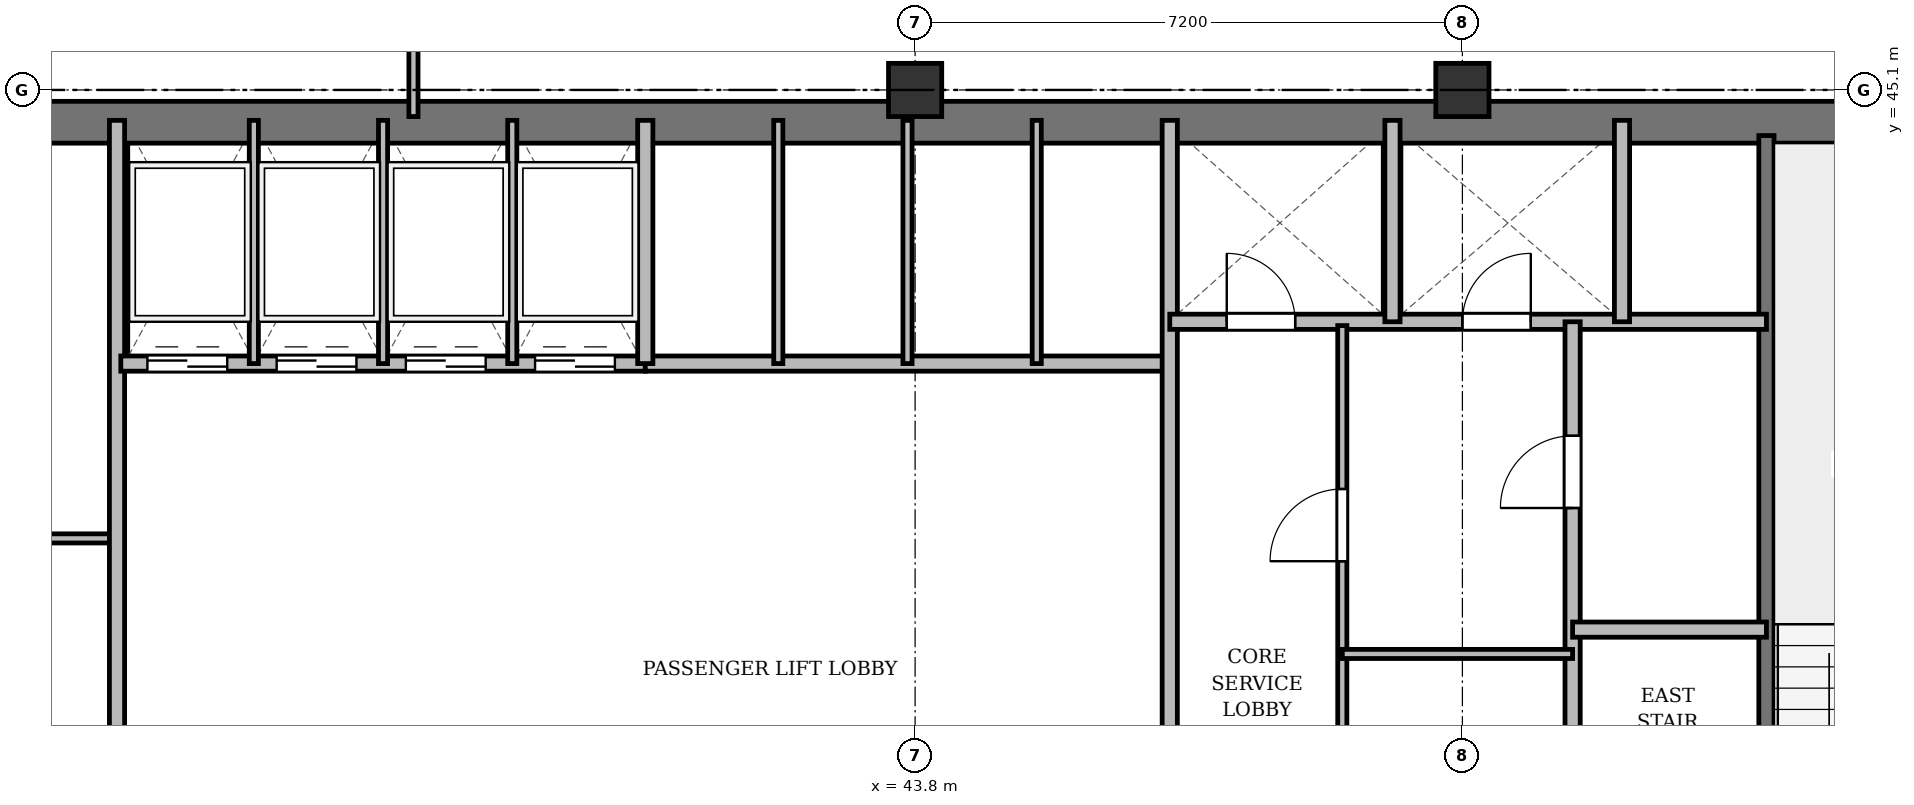
"""IFC4 building model, lengths in metres.
Left out: names, types, materials, properties, quantities, classifications, styles, units other than length and angle.
Written with IfcOpenShell. Run it as: python <this file> out.ifc"""

import sys

from ifc_helpers import new_model, si_unit, direction, frame, frame_2d, origin, origin_2d, place, context, subcontext, project, spatial, rectangle, extrude, source, transform, mapped, element, fill, save


model = new_model("IFC4")
c1 = context("Model", 3, precision=1e-05, world=origin(), true_north=direction((0.0, 1.0)))
c2 = subcontext(c1, "Body", "Model", "MODEL_VIEW")
j1 = project(units=[si_unit("LENGTHUNIT", "METRE"), si_unit("PLANEANGLEUNIT", "RADIAN")], contexts=[c1])
p1 = place(None, origin())
s1 = spatial("IfcSite", under=j1, at=p1, CompositionType="ELEMENT")
p2 = place(p1, origin())
s2 = spatial("IfcBuilding", under=s1, at=p2, CompositionType="ELEMENT")
p3 = place(p2, frame((0.0, 0.0, 201.3)))
s3 = spatial("IfcBuildingStorey", under=s2, at=p3, CompositionType="ELEMENT", Elevation=201.3)
m1 = source(origin(), c2, "Body", "SweptSolid", [
    extrude(rectangle(XDim=0.7, YDim=0.7, at=origin_2d()), origin(), (0.0, 0.0, 1.0), 3.6),
])
for number, where, z_axis, x_axis in (
    (1, (43.8, 45.1, 0.0), (0.0, 0.0, 1.0), (1.0, 0.0, 0.0)),
    (2, (51.0, 45.1, 0.0), (0.0, 0.0, 1.0), (1.0, 0.0, 0.0)),
):
    element("IfcColumn", number, at=place(p3, frame(where, z_axis=z_axis, x_axis=x_axis)), inside=s3, PredefinedType="COLUMN", context=c2, shape_type="MappedRepresentation", body=[
        mapped(m1, transform((0.0, 0.0, 0.0), x_axis=(1.0, 0.0, 0.0), y_axis=(0.0, 1.0, 0.0), z_axis=(0.0, 0.0, 1.0), scale=1.0)),
    ])
p4 = place(p3, frame((15.65, 44.675, 0.0), z_axis=(0.0, 0.0, 1.0), x_axis=(1.0, 0.0, 0.0)))
e3 = element("IfcWall", 3, at=p4, inside=s3, PredefinedType="SHEAR", context=c2, shape_type="SweptSolid", body=[
    extrude(rectangle(XDim=43.1, YDim=0.55, at=frame_2d((21.55, 0.0))), origin(), (0.0, 0.0, 1.0), 3.22),
])
p5 = place(p3, frame((55.0, 33.4, 0.0), z_axis=(0.0, 0.0, 1.0), x_axis=(0.0, 1.0, 0.0)))
e4 = element("IfcWall", 4, at=p5, inside=s3, PredefinedType="SHEAR", context=c2, shape_type="SweptSolid", body=[
    extrude(rectangle(XDim=11.1, YDim=0.2, at=frame_2d((5.55, 0.0))), origin(), (0.0, 0.0, 1.0), 3.22),
])
p6 = place(p5, frame((0.85, 0.0, 0.0)))
e5 = element("IfcOpeningElement", 5, at=p6, cuts=e4, PredefinedType="OPENING", context=c2, shape_type="SweptSolid", body=[
    extrude(rectangle(XDim=1.1, YDim=2.15, at=frame_2d((0.55, 1.075))), frame((0.0, 0.11, 0.0), z_axis=(0.0, -1.0, 0.0), x_axis=(1.0, 0.0, 0.0)), (0.0, 0.0, 1.0), 0.22),
])
p7 = place(p3, frame((26.3, 39.2, 0.0), z_axis=(0.0, 0.0, 1.0), x_axis=(1.0, 0.0, 0.0)))
e6 = element("IfcWall", 6, at=p7, inside=s3, PredefinedType="PARTITIONING", context=c2, shape_type="SweptSolid", body=[
    extrude(rectangle(XDim=7.0, YDim=0.12, at=frame_2d((3.5, 0.0))), origin(), (0.0, 0.0, 1.0), 2.72),
])
p8 = place(p7, frame((2.6, 0.0, 0.0)))
e7 = element("IfcOpeningElement", 7, at=p8, cuts=e6, PredefinedType="OPENING", context=c2, shape_type="SweptSolid", body=[
    extrude(rectangle(XDim=0.95, YDim=2.15, at=frame_2d((0.475, 1.075))), frame((0.0, 0.07, 0.0), z_axis=(0.0, -1.0, 0.0), x_axis=(1.0, 0.0, 0.0)), (0.0, 0.0, 1.0), 0.14),
])
p9 = place(p3, frame((33.3, 33.4, 0.0), z_axis=(0.0, 0.0, 1.0), x_axis=(0.0, 1.0, 0.0)))
e8 = element("IfcWall", 8, at=p9, inside=s3, PredefinedType="SOLIDWALL", context=c2, shape_type="SweptSolid", body=[
    extrude(rectangle(XDim=11.3, YDim=0.2, at=frame_2d((5.65, 0.0))), origin(), (0.0, 0.0, 1.0), 2.77),
])
p10 = place(p3, frame((33.35, 41.5, 0.0), z_axis=(0.0, 0.0, 1.0), x_axis=(1.0, 0.0, 0.0)))
e9 = element("IfcWall", 9, at=p10, inside=s3, PredefinedType="SOLIDWALL", context=c2, shape_type="SweptSolid", body=[
    extrude(rectangle(XDim=6.9, YDim=0.2, at=frame_2d((3.45, 0.0))), origin(), (0.0, 0.0, 1.0), 3.22),
])
p11 = place(p10, frame((0.35, 0.0, 0.0)))
e10 = element("IfcOpeningElement", 10, at=p11, cuts=e9, PredefinedType="OPENING", context=c2, shape_type="SweptSolid", body=[
    extrude(rectangle(XDim=1.05, YDim=2.15, at=frame_2d((0.525, 1.075))), frame((0.0, 0.11, 0.0), z_axis=(0.0, -1.0, 0.0), x_axis=(1.0, 0.0, 0.0)), (0.0, 0.0, 1.0), 0.22),
])
p12 = place(p10, frame((2.05, 0.0, 0.0)))
e11 = element("IfcOpeningElement", 11, at=p12, cuts=e9, PredefinedType="OPENING", context=c2, shape_type="SweptSolid", body=[
    extrude(rectangle(XDim=1.05, YDim=2.15, at=frame_2d((0.525, 1.075))), frame((0.0, 0.11, 0.0), z_axis=(0.0, -1.0, 0.0), x_axis=(1.0, 0.0, 0.0)), (0.0, 0.0, 1.0), 0.22),
])
p13 = place(p10, frame((3.75, 0.0, 0.0)))
e12 = element("IfcOpeningElement", 12, at=p13, cuts=e9, PredefinedType="OPENING", context=c2, shape_type="SweptSolid", body=[
    extrude(rectangle(XDim=1.05, YDim=2.15, at=frame_2d((0.525, 1.075))), frame((0.0, 0.11, 0.0), z_axis=(0.0, -1.0, 0.0), x_axis=(1.0, 0.0, 0.0)), (0.0, 0.0, 1.0), 0.22),
])
p14 = place(p10, frame((5.45, 0.0, 0.0)))
e13 = element("IfcOpeningElement", 13, at=p14, cuts=e9, PredefinedType="OPENING", context=c2, shape_type="SweptSolid", body=[
    extrude(rectangle(XDim=1.05, YDim=2.15, at=frame_2d((0.525, 1.075))), frame((0.0, 0.11, 0.0), z_axis=(0.0, -1.0, 0.0), x_axis=(1.0, 0.0, 0.0)), (0.0, 0.0, 1.0), 0.22),
])
for number, where, z_axis, x_axis in (
    (14, (35.1, 41.5, 0.0), (0.0, 0.0, 1.0), (0.0, 1.0, 0.0)),
    (15, (36.8, 41.5, 0.0), (0.0, 0.0, 1.0), (0.0, 1.0, 0.0)),
    (16, (38.5, 41.5, 0.0), (0.0, 0.0, 1.0), (0.0, 1.0, 0.0)),
):
    element("IfcWall", number, at=place(p3, frame(where, z_axis=z_axis, x_axis=x_axis)), inside=s3, PredefinedType="PARTITIONING", context=c2, shape_type="SweptSolid", body=[
        extrude(rectangle(XDim=3.2, YDim=0.12, at=frame_2d((1.6, 0.0))), origin(), (0.0, 0.0, 1.0), 3.22),
    ])
p15 = place(p3, frame((40.25, 41.5, 0.0), z_axis=(0.0, 0.0, 1.0), x_axis=(1.0, 0.0, 0.0)))
e17 = element("IfcWall", 17, at=p15, inside=s3, PredefinedType="SOLIDWALL", context=c2, shape_type="SweptSolid", body=[
    extrude(rectangle(XDim=6.9, YDim=0.2, at=frame_2d((3.45, 0.0))), origin(), (0.0, 0.0, 1.0), 2.72),
])
p16 = place(p3, frame((40.25, 41.5, 0.0), z_axis=(0.0, 0.0, 1.0), x_axis=(0.0, 1.0, 0.0)))
e18 = element("IfcWall", 18, at=p16, inside=s3, PredefinedType="SOLIDWALL", context=c2, shape_type="SweptSolid", body=[
    extrude(rectangle(XDim=3.2, YDim=0.2, at=frame_2d((1.6, 0.0))), origin(), (0.0, 0.0, 1.0), 3.22),
])
p17 = place(p3, frame((42.0, 41.5, 0.0), z_axis=(0.0, 0.0, 1.0), x_axis=(0.0, 1.0, 0.0)))
e19 = element("IfcWall", 19, at=p17, inside=s3, PredefinedType="PARTITIONING", context=c2, shape_type="SweptSolid", body=[
    extrude(rectangle(XDim=3.2, YDim=0.12, at=frame_2d((1.6, 0.0))), origin(), (0.0, 0.0, 1.0), 3.22),
])
p18 = place(p3, frame((43.7, 41.5, 0.0), z_axis=(0.0, 0.0, 1.0), x_axis=(0.0, 1.0, 0.0)))
e20 = element("IfcWall", 20, at=p18, inside=s3, PredefinedType="PARTITIONING", context=c2, shape_type="SweptSolid", body=[
    extrude(rectangle(XDim=3.2, YDim=0.12, at=frame_2d((1.6, 0.0))), origin(), (0.0, 0.0, 1.0), 2.72),
])
p19 = place(p3, frame((45.4, 41.5, 0.0), z_axis=(0.0, 0.0, 1.0), x_axis=(0.0, 1.0, 0.0)))
e21 = element("IfcWall", 21, at=p19, inside=s3, PredefinedType="PARTITIONING", context=c2, shape_type="SweptSolid", body=[
    extrude(rectangle(XDim=3.2, YDim=0.12, at=frame_2d((1.6, 0.0))), origin(), (0.0, 0.0, 1.0), 3.22),
])
p20 = place(p3, frame((47.15, 33.4, 0.0), z_axis=(0.0, 0.0, 1.0), x_axis=(0.0, 1.0, 0.0)))
e22 = element("IfcWall", 22, at=p20, inside=s3, PredefinedType="SOLIDWALL", context=c2, shape_type="SweptSolid", body=[
    extrude(rectangle(XDim=11.3, YDim=0.2, at=frame_2d((5.65, 0.0))), origin(), (0.0, 0.0, 1.0), 2.77),
])
p21 = place(p3, frame((47.15, 42.05, 0.0), z_axis=(0.0, 0.0, 1.0), x_axis=(1.0, 0.0, 0.0)))
e23 = element("IfcWall", 23, at=p21, inside=s3, PredefinedType="SOLIDWALL", context=c2, shape_type="SweptSolid", body=[
    extrude(rectangle(XDim=7.85, YDim=0.2, at=frame_2d((3.925, 0.0))), origin(), (0.0, 0.0, 1.0), 2.72),
])
p22 = place(p21, frame((0.75, 0.0, 0.0)))
e24 = element("IfcOpeningElement", 24, at=p22, cuts=e23, PredefinedType="OPENING", context=c2, shape_type="SweptSolid", body=[
    extrude(rectangle(XDim=0.9, YDim=2.1, at=frame_2d((0.45, 1.05))), frame((0.0, 0.11, 0.0), z_axis=(0.0, -1.0, 0.0), x_axis=(1.0, 0.0, 0.0)), (0.0, 0.0, 1.0), 0.22),
])
p23 = place(p21, frame((3.85, 0.0, 0.0)))
e25 = element("IfcOpeningElement", 25, at=p23, cuts=e23, PredefinedType="OPENING", context=c2, shape_type="SweptSolid", body=[
    extrude(rectangle(XDim=0.9, YDim=2.1, at=frame_2d((0.45, 1.05))), frame((0.0, 0.11, 0.0), z_axis=(0.0, -1.0, 0.0), x_axis=(1.0, 0.0, 0.0)), (0.0, 0.0, 1.0), 0.22),
])
for number, where, z_axis, x_axis in (
    (26, (50.08, 42.05, 0.0), (0.0, 0.0, 1.0), (0.0, 1.0, 0.0)),
    (27, (53.1, 42.05, 0.0), (0.0, 0.0, 1.0), (0.0, 1.0, 0.0)),
):
    element("IfcWall", number, at=place(p3, frame(where, z_axis=z_axis, x_axis=x_axis)), inside=s3, PredefinedType="SOLIDWALL", context=c2, shape_type="SweptSolid", body=[
        extrude(rectangle(XDim=2.65, YDim=0.2, at=frame_2d((1.325, 0.0))), origin(), (0.0, 0.0, 1.0), 3.22),
    ])
p24 = place(p3, frame((52.45, 33.4, 0.0), z_axis=(0.0, 0.0, 1.0), x_axis=(0.0, 1.0, 0.0)))
e28 = element("IfcWall", 28, at=p24, inside=s3, PredefinedType="PARTITIONING", context=c2, shape_type="SweptSolid", body=[
    extrude(rectangle(XDim=8.65, YDim=0.2, at=frame_2d((4.325, 0.0))), origin(), (0.0, 0.0, 1.0), 2.77),
])
p25 = place(p24, frame((6.2, 0.0, 0.0)))
e29 = element("IfcOpeningElement", 29, at=p25, cuts=e28, PredefinedType="OPENING", context=c2, shape_type="SweptSolid", body=[
    extrude(rectangle(XDim=0.95, YDim=2.15, at=frame_2d((0.475, 1.075))), frame((0.0, 0.11, 0.0), z_axis=(0.0, -1.0, 0.0), x_axis=(1.0, 0.0, 0.0)), (0.0, 0.0, 1.0), 0.22),
])
p26 = place(p3, frame((52.45, 38.0, 0.0), z_axis=(0.0, 0.0, 1.0), x_axis=(1.0, 0.0, 0.0)))
e30 = element("IfcWall", 30, at=p26, inside=s3, PredefinedType="PARTITIONING", context=c2, shape_type="SweptSolid", body=[
    extrude(rectangle(XDim=2.55, YDim=0.2, at=frame_2d((1.275, 0.0))), origin(), (0.0, 0.0, 1.0), 3.22),
])
p27 = place(p3, frame((49.42, 33.4, 0.0), z_axis=(0.0, 0.0, 1.0), x_axis=(0.0, 1.0, 0.0)))
e31 = element("IfcWall", 31, at=p27, inside=s3, PredefinedType="PARTITIONING", context=c2, shape_type="SweptSolid", body=[
    extrude(rectangle(XDim=8.6, YDim=0.12, at=frame_2d((4.3, 0.0))), origin(), (0.0, 0.0, 1.0), 2.77),
])
p28 = place(p27, frame((1.3, 0.0, 0.0)))
e32 = element("IfcOpeningElement", 32, at=p28, cuts=e31, PredefinedType="OPENING", context=c2, shape_type="SweptSolid", body=[
    extrude(rectangle(XDim=0.95, YDim=2.15, at=frame_2d((0.475, 1.075))), frame((0.0, 0.07, 0.0), z_axis=(0.0, -1.0, 0.0), x_axis=(1.0, 0.0, 0.0)), (0.0, 0.0, 1.0), 0.14),
])
p29 = place(p27, frame((5.5, 0.0, 0.0)))
e33 = element("IfcOpeningElement", 33, at=p29, cuts=e31, PredefinedType="OPENING", context=c2, shape_type="SweptSolid", body=[
    extrude(rectangle(XDim=0.95, YDim=2.15, at=frame_2d((0.475, 1.075))), frame((0.0, 0.07, 0.0), z_axis=(0.0, -1.0, 0.0), x_axis=(1.0, 0.0, 0.0)), (0.0, 0.0, 1.0), 0.14),
])
p30 = place(p3, frame((49.42, 37.68, 0.0), z_axis=(0.0, 0.0, 1.0), x_axis=(1.0, 0.0, 0.0)))
e34 = element("IfcWall", 34, at=p30, inside=s3, PredefinedType="PARTITIONING", context=c2, shape_type="SweptSolid", body=[
    extrude(rectangle(XDim=3.03, YDim=0.12, at=frame_2d((1.515, 0.0))), origin(), (0.0, 0.0, 1.0), 2.72),
])
p31 = place(p3, frame((37.2, 44.75, 0.0), z_axis=(0.0, 0.0, 1.0), x_axis=(0.0, 1.0, 0.0)))
e35 = element("IfcWall", 35, at=p31, inside=s3, PredefinedType="PARTITIONING", context=c2, shape_type="SweptSolid", body=[
    extrude(rectangle(XDim=3.61, YDim=0.12, at=frame_2d((1.805, 0.0))), origin(), (0.0, 0.0, 1.0), 2.77),
])
p32 = place(p31, frame((1.1, 0.0, 0.0)))
e36 = element("IfcOpeningElement", 36, at=p32, cuts=e35, PredefinedType="OPENING", context=c2, shape_type="SweptSolid", body=[
    extrude(rectangle(XDim=0.95, YDim=2.15, at=frame_2d((0.475, 1.075))), frame((0.0, 0.07, 0.0), z_axis=(0.0, -1.0, 0.0), x_axis=(1.0, 0.0, 0.0)), (0.0, 0.0, 1.0), 0.14),
])
m2 = source(origin(), c2, "Body", "SweptSolid", [
    extrude(rectangle(XDim=1.05, YDim=2.15, at=frame_2d((0.525, 1.075))), frame((0.0, 0.025, 0.0), z_axis=(0.0, -1.0, 0.0), x_axis=(1.0, 0.0, 0.0)), (0.0, 0.0, 1.0), 0.05),
])
p33 = place(p11, origin())
e37 = element("IfcDoor", 37, at=p33, inside=s3, OperationType="DOUBLE_DOOR_SLIDING", PredefinedType="DOOR", context=c2, shape_type="MappedRepresentation", body=[
    mapped(m2, transform((0.0, 0.0, 0.0), x_axis=(1.0, 0.0, 0.0), y_axis=(0.0, 1.0, 0.0), z_axis=(0.0, 0.0, 1.0), scale=1.0)),
])
fill(e10, e37)
p34 = place(p12, origin())
e38 = element("IfcDoor", 38, at=p34, inside=s3, OperationType="DOUBLE_DOOR_SLIDING", PredefinedType="DOOR", context=c2, shape_type="MappedRepresentation", body=[
    mapped(m2, transform((0.0, 0.0, 0.0), x_axis=(1.0, 0.0, 0.0), y_axis=(0.0, 1.0, 0.0), z_axis=(0.0, 0.0, 1.0), scale=1.0)),
])
fill(e11, e38)
p35 = place(p13, origin())
e39 = element("IfcDoor", 39, at=p35, inside=s3, OperationType="DOUBLE_DOOR_SLIDING", PredefinedType="DOOR", context=c2, shape_type="MappedRepresentation", body=[
    mapped(m2, transform((0.0, 0.0, 0.0), x_axis=(1.0, 0.0, 0.0), y_axis=(0.0, 1.0, 0.0), z_axis=(0.0, 0.0, 1.0), scale=1.0)),
])
fill(e12, e39)
p36 = place(p14, origin())
e40 = element("IfcDoor", 40, at=p36, inside=s3, OperationType="DOUBLE_DOOR_SLIDING", PredefinedType="DOOR", context=c2, shape_type="MappedRepresentation", body=[
    mapped(m2, transform((0.0, 0.0, 0.0), x_axis=(1.0, 0.0, 0.0), y_axis=(0.0, 1.0, 0.0), z_axis=(0.0, 0.0, 1.0), scale=1.0)),
])
fill(e13, e40)
m3 = source(origin(), c2, "Body", "SweptSolid", [
    extrude(rectangle(XDim=0.9, YDim=2.1, at=frame_2d((0.45, 1.05))), frame((0.0, 0.025, 0.0), z_axis=(0.0, -1.0, 0.0), x_axis=(1.0, 0.0, 0.0)), (0.0, 0.0, 1.0), 0.05),
])
p37 = place(p22, origin())
e41 = element("IfcDoor", 41, at=p37, inside=s3, OperationType="SINGLE_SWING_LEFT", PredefinedType="DOOR", context=c2, shape_type="MappedRepresentation", body=[
    mapped(m3, transform((0.0, 0.0, 0.0), x_axis=(1.0, 0.0, 0.0), y_axis=(0.0, 1.0, 0.0), z_axis=(0.0, 0.0, 1.0), scale=1.0)),
])
fill(e24, e41)
p38 = place(p23, origin())
e42 = element("IfcDoor", 42, at=p38, inside=s3, OperationType="SINGLE_SWING_RIGHT", PredefinedType="DOOR", context=c2, shape_type="MappedRepresentation", body=[
    mapped(m3, transform((0.0, 0.0, 0.0), x_axis=(1.0, 0.0, 0.0), y_axis=(0.0, 1.0, 0.0), z_axis=(0.0, 0.0, 1.0), scale=1.0)),
])
fill(e25, e42)
m4 = source(origin(), c2, "Body", "SweptSolid", [
    extrude(rectangle(XDim=0.95, YDim=2.15, at=frame_2d((0.475, 1.075))), frame((0.0, 0.025, 0.0), z_axis=(0.0, -1.0, 0.0), x_axis=(1.0, 0.0, 0.0)), (0.0, 0.0, 1.0), 0.05),
])
p39 = place(p25, origin())
e43 = element("IfcDoor", 43, at=p39, inside=s3, OperationType="SINGLE_SWING_LEFT", PredefinedType="DOOR", context=c2, shape_type="MappedRepresentation", body=[
    mapped(m4, transform((0.0, 0.0, 0.0), x_axis=(1.0, 0.0, 0.0), y_axis=(0.0, 1.0, 0.0), z_axis=(0.0, 0.0, 1.0), scale=1.0)),
])
fill(e29, e43)
p40 = place(p29, origin())
e44 = element("IfcDoor", 44, at=p40, inside=s3, OperationType="SINGLE_SWING_LEFT", PredefinedType="DOOR", context=c2, shape_type="MappedRepresentation", body=[
    mapped(m4, transform((0.0, 0.0, 0.0), x_axis=(1.0, 0.0, 0.0), y_axis=(0.0, 1.0, 0.0), z_axis=(0.0, 0.0, 1.0), scale=1.0)),
])
fill(e33, e44)
save(model, sys.argv[1])
